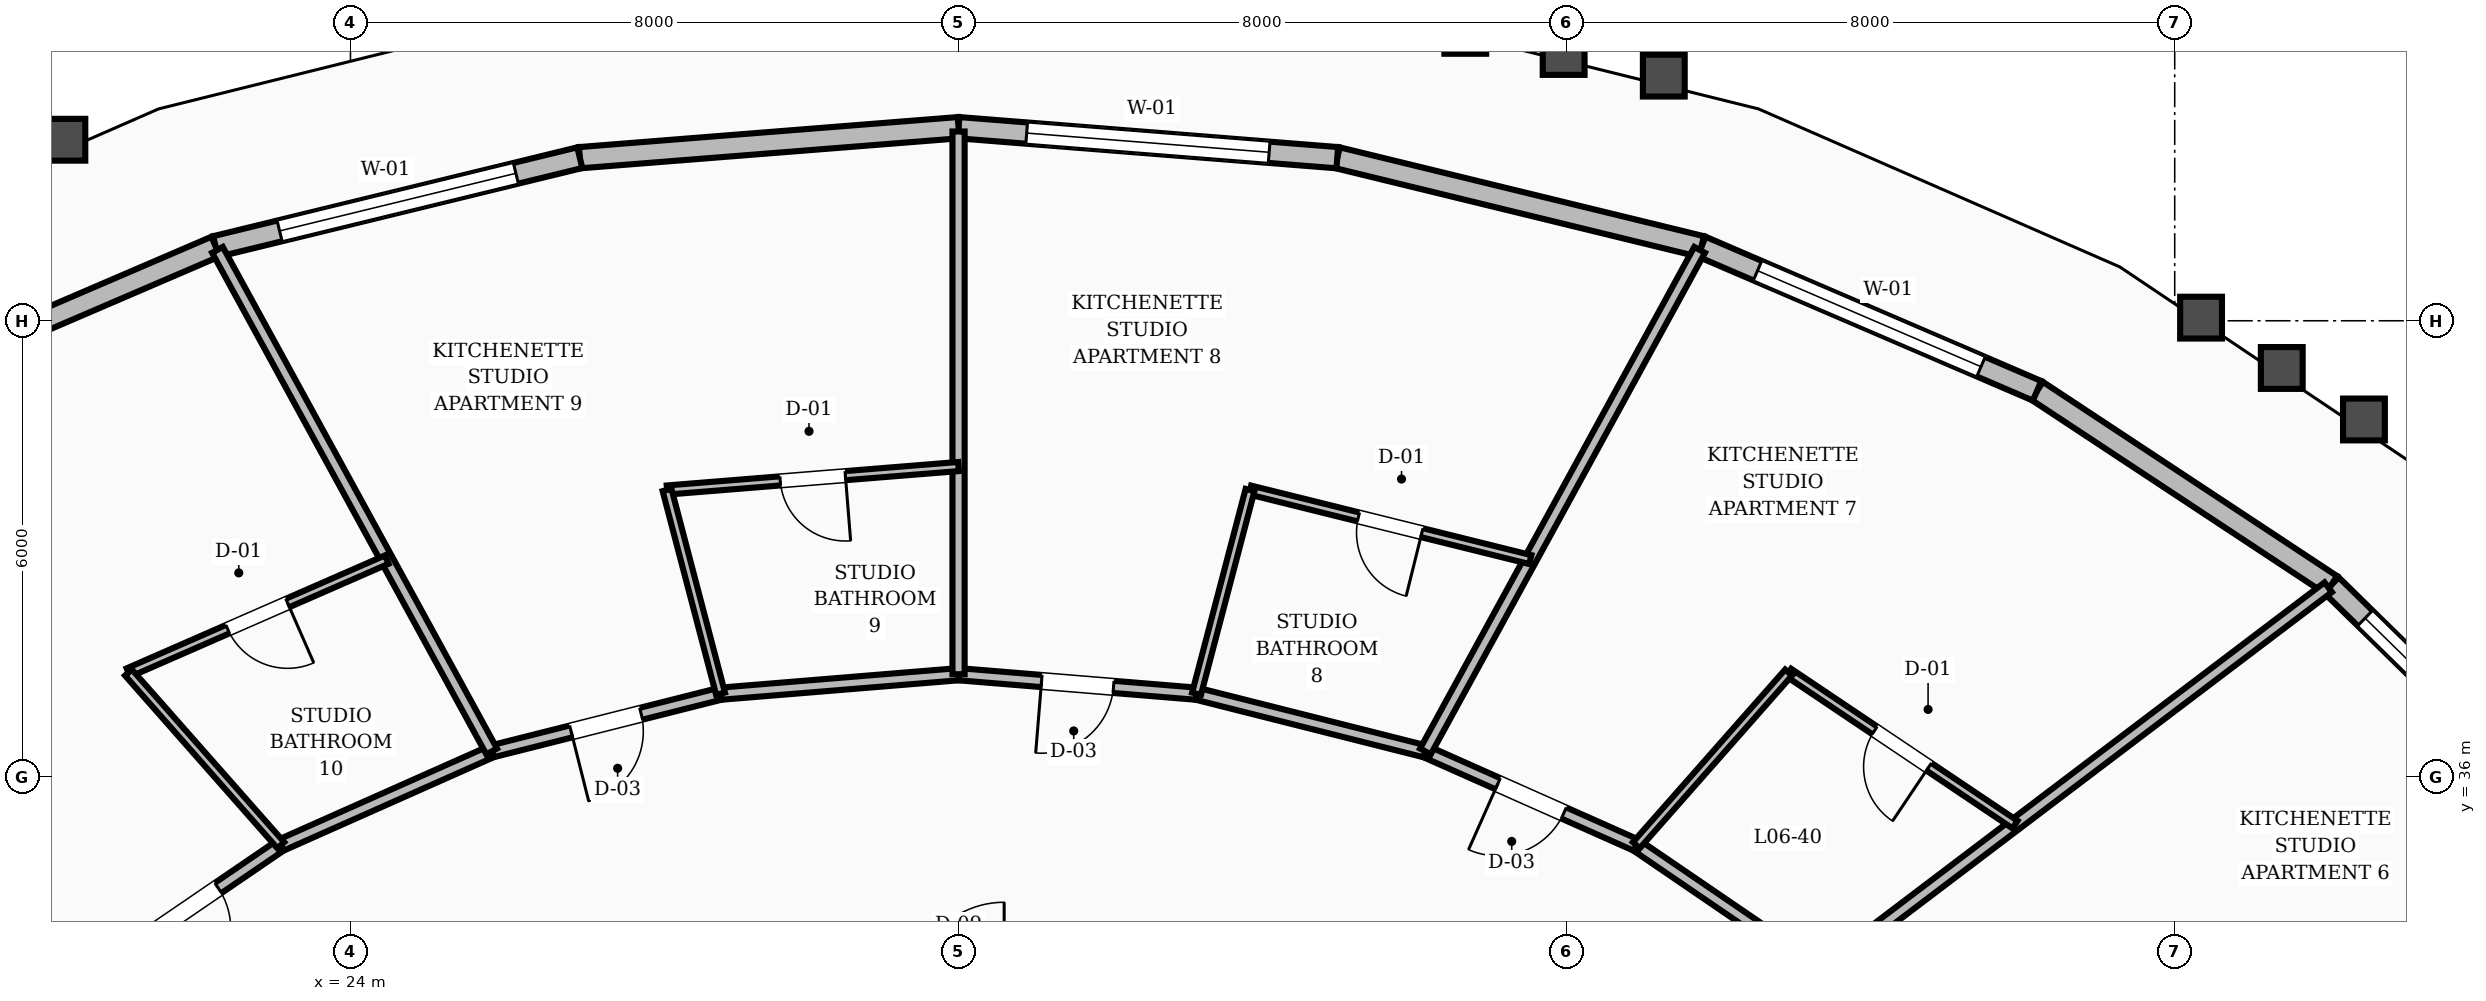
"""IFC4 building model, lengths in metres.
Left out: names, types, materials, properties, quantities, classifications, styles, units other than length and angle.
Written with IfcOpenShell. Run it as: python <this file> out.ifc"""

import sys

from ifc_helpers import new_model, si_unit, direction, frame, frame_2d, origin, place, context, subcontext, project, spatial, rectangle, extrude, element, fill, save


model = new_model("IFC4")
c1 = context("Model", 3, precision=1e-05, world=origin(), true_north=direction((0.0, 1.0)))
c2 = subcontext(c1, "Body", "Model", "MODEL_VIEW")
j1 = project(units=[si_unit("LENGTHUNIT", "METRE"), si_unit("PLANEANGLEUNIT", "RADIAN")], contexts=[c1])
p1 = place(None, origin())
s1 = spatial("IfcSite", under=j1, at=p1, CompositionType="ELEMENT")
p2 = place(p1, origin())
s2 = spatial("IfcBuilding", under=s1, at=p2, CompositionType="ELEMENT")
p3 = place(p2, frame((0.0, 0.0, 30.4)))
s3 = spatial("IfcBuildingStorey", under=s2, at=p3, CompositionType="ELEMENT", Elevation=30.4)
p4 = place(p3, frame((53.236, 35.411, 0.0), z_axis=(0.0, 0.0, 1.0), x_axis=(-0.714207899037, 0.699933623248, 0.0)))
e1 = element("IfcWall", 1, at=p4, inside=s3, PredefinedType="STANDARD", context=c2, shape_type="SweptSolid", body=[
    extrude(rectangle(XDim=4.447, YDim=0.28, at=frame_2d((2.224, 0.0))), origin(), (0.0, 0.0, 1.0), 2.65),
])
p5 = place(p4, frame((0.624, 0.0, 0.8)))
e2 = element("IfcOpeningElement", 2, at=p5, cuts=e1, PredefinedType="OPENING", context=c2, shape_type="SweptSolid", body=[
    extrude(rectangle(XDim=3.2, YDim=1.65, at=frame_2d((1.6, 0.825))), frame((0.0, 0.15, 0.0), z_axis=(0.0, -1.0, 0.0), x_axis=(1.0, 0.0, 0.0)), (0.0, 0.0, 1.0), 0.3),
])
p6 = place(p3, frame((50.06, 38.524, 0.0), z_axis=(0.0, 0.0, 1.0), x_axis=(-0.834608922487, 0.550842941776, 0.0)))
e3 = element("IfcWall", 3, at=p6, inside=s3, PredefinedType="STANDARD", context=c2, shape_type="SweptSolid", body=[
    extrude(rectangle(XDim=4.637, YDim=0.28, at=frame_2d((2.319, 0.0))), origin(), (0.0, 0.0, 1.0), 2.65),
])
p7 = place(p3, frame((46.189, 41.078, 0.0), z_axis=(0.0, 0.0, 1.0), x_axis=(-0.918705683067, 0.394942866629, 0.0)))
e4 = element("IfcWall", 4, at=p7, inside=s3, PredefinedType="STANDARD", context=c2, shape_type="SweptSolid", body=[
    extrude(rectangle(XDim=4.806, YDim=0.28, at=frame_2d((2.403, 0.0))), origin(), (0.0, 0.0, 1.0), 2.65),
])
p8 = place(p7, frame((0.803, 0.0, 0.8)))
e5 = element("IfcOpeningElement", 5, at=p8, cuts=e4, PredefinedType="OPENING", context=c2, shape_type="SweptSolid", body=[
    extrude(rectangle(XDim=3.2, YDim=1.65, at=frame_2d((1.6, 0.825))), frame((0.0, 0.15, 0.0), z_axis=(0.0, -1.0, 0.0), x_axis=(1.0, 0.0, 0.0)), (0.0, 0.0, 1.0), 0.3),
])
p9 = place(p3, frame((41.774, 42.977, 0.0), z_axis=(0.0, 0.0, 1.0), x_axis=(-0.97151283312, 0.236986951292, 0.0)))
e6 = element("IfcWall", 6, at=p9, inside=s3, PredefinedType="STANDARD", context=c2, shape_type="SweptSolid", body=[
    extrude(rectangle(XDim=4.931, YDim=0.28, at=frame_2d((2.466, 0.0))), origin(), (0.0, 0.0, 1.0), 2.65),
])
p10 = place(p3, frame((36.983, 44.145, 0.0), z_axis=(0.0, 0.0, 1.0), x_axis=(-0.996876023292, 0.078982239682, 0.0)))
e7 = element("IfcWall", 7, at=p10, inside=s3, PredefinedType="STANDARD", context=c2, shape_type="SweptSolid", body=[
    extrude(rectangle(XDim=4.998, YDim=0.28, at=frame_2d((2.499, 0.0))), origin(), (0.0, 0.0, 1.0), 2.65),
])
p11 = place(p10, frame((0.899, 0.0, 0.8)))
e8 = element("IfcOpeningElement", 8, at=p11, cuts=e7, PredefinedType="OPENING", context=c2, shape_type="SweptSolid", body=[
    extrude(rectangle(XDim=3.2, YDim=1.65, at=frame_2d((1.6, 0.825))), frame((0.0, 0.15, 0.0), z_axis=(0.0, -1.0, 0.0), x_axis=(1.0, 0.0, 0.0)), (0.0, 0.0, 1.0), 0.3),
])
p12 = place(p3, frame((32.0, 44.54, 0.0), z_axis=(0.0, 0.0, 1.0), x_axis=(-0.996876023292, -0.078982239682, 0.0)))
e9 = element("IfcWall", 9, at=p12, inside=s3, PredefinedType="STANDARD", context=c2, shape_type="SweptSolid", body=[
    extrude(rectangle(XDim=4.998, YDim=0.28, at=frame_2d((2.499, 0.0))), origin(), (0.0, 0.0, 1.0), 2.65),
])
p13 = place(p3, frame((27.017, 44.145, 0.0), z_axis=(0.0, 0.0, 1.0), x_axis=(-0.97151283312, -0.236986951292, 0.0)))
e10 = element("IfcWall", 10, at=p13, inside=s3, PredefinedType="STANDARD", context=c2, shape_type="SweptSolid", body=[
    extrude(rectangle(XDim=4.931, YDim=0.28, at=frame_2d((2.466, 0.0))), origin(), (0.0, 0.0, 1.0), 2.65),
])
p14 = place(p13, frame((0.866, 0.0, 0.8)))
e11 = element("IfcOpeningElement", 11, at=p14, cuts=e10, PredefinedType="OPENING", context=c2, shape_type="SweptSolid", body=[
    extrude(rectangle(XDim=3.2, YDim=1.65, at=frame_2d((1.6, 0.825))), frame((0.0, 0.15, 0.0), z_axis=(0.0, -1.0, 0.0), x_axis=(1.0, 0.0, 0.0)), (0.0, 0.0, 1.0), 0.3),
])
p15 = place(p3, frame((22.226, 42.977, 0.0), z_axis=(0.0, 0.0, 1.0), x_axis=(-0.918705683067, -0.394942866629, 0.0)))
e12 = element("IfcWall", 12, at=p15, inside=s3, PredefinedType="STANDARD", context=c2, shape_type="SweptSolid", body=[
    extrude(rectangle(XDim=4.806, YDim=0.28, at=frame_2d((2.403, 0.0))), origin(), (0.0, 0.0, 1.0), 2.65),
])
p16 = place(p3, frame((43.349, 33.44, 0.0), z_axis=(0.0, 0.0, 1.0), x_axis=(-0.825929039072, 0.563774088104, 0.0)))
e13 = element("IfcWall", 13, at=p16, inside=s3, PredefinedType="SOLIDWALL", context=c2, shape_type="SweptSolid", body=[
    extrude(rectangle(XDim=2.945, YDim=0.16, at=frame_2d((1.472, 0.0))), origin(), (0.0, 0.0, 1.0), 2.61),
])
p17 = place(p3, frame((40.917, 35.1, 0.0), z_axis=(0.0, 0.0, 1.0), x_axis=(-0.913768445178, 0.406235434936, 0.0)))
e14 = element("IfcWall", 14, at=p17, inside=s3, PredefinedType="SOLIDWALL", context=c2, shape_type="SweptSolid", body=[
    extrude(rectangle(XDim=3.037, YDim=0.16, at=frame_2d((1.519, 0.0))), origin(), (0.0, 0.0, 1.0), 2.61),
])
p18 = place(p17, frame((1.043, 0.0, 0.0)))
e15 = element("IfcOpeningElement", 15, at=p18, cuts=e14, PredefinedType="OPENING", context=c2, shape_type="SweptSolid", body=[
    extrude(rectangle(XDim=0.95, YDim=2.1, at=frame_2d((0.475, 1.05))), frame((0.0, 0.09, 0.0), z_axis=(0.0, -1.0, 0.0), x_axis=(1.0, 0.0, 0.0)), (0.0, 0.0, 1.0), 0.18),
])
p19 = place(p3, frame((38.142, 36.334, 0.0), z_axis=(0.0, 0.0, 1.0), x_axis=(-0.969608333194, 0.244662380029, 0.0)))
e16 = element("IfcWall", 16, at=p19, inside=s3, PredefinedType="SOLIDWALL", context=c2, shape_type="SweptSolid", body=[
    extrude(rectangle(XDim=3.105, YDim=0.16, at=frame_2d((1.553, 0.0))), origin(), (0.0, 0.0, 1.0), 2.61),
])
p20 = place(p3, frame((35.131, 37.094, 0.0), z_axis=(0.0, 0.0, 1.0), x_axis=(-0.996658973252, 0.081675522876, 0.0)))
e17 = element("IfcWall", 17, at=p20, inside=s3, PredefinedType="SOLIDWALL", context=c2, shape_type="SweptSolid", body=[
    extrude(rectangle(XDim=3.142, YDim=0.16, at=frame_2d((1.571, 0.0))), origin(), (0.0, 0.0, 1.0), 2.61),
])
p21 = place(p20, frame((1.096, 0.0, 0.0)))
e18 = element("IfcOpeningElement", 18, at=p21, cuts=e17, PredefinedType="OPENING", context=c2, shape_type="SweptSolid", body=[
    extrude(rectangle(XDim=0.95, YDim=2.1, at=frame_2d((0.475, 1.05))), frame((0.0, 0.09, 0.0), z_axis=(0.0, -1.0, 0.0), x_axis=(1.0, 0.0, 0.0)), (0.0, 0.0, 1.0), 0.18),
])
p22 = place(p3, frame((32.0, 37.35, 0.0), z_axis=(0.0, 0.0, 1.0), x_axis=(-0.996658973252, -0.081675522876, 0.0)))
e19 = element("IfcWall", 19, at=p22, inside=s3, PredefinedType="SOLIDWALL", context=c2, shape_type="SweptSolid", body=[
    extrude(rectangle(XDim=3.142, YDim=0.16, at=frame_2d((1.571, 0.0))), origin(), (0.0, 0.0, 1.0), 2.61),
])
p23 = place(p3, frame((28.869, 37.094, 0.0), z_axis=(0.0, 0.0, 1.0), x_axis=(-0.969608333194, -0.244662380029, 0.0)))
e20 = element("IfcWall", 20, at=p23, inside=s3, PredefinedType="SOLIDWALL", context=c2, shape_type="SweptSolid", body=[
    extrude(rectangle(XDim=3.105, YDim=0.16, at=frame_2d((1.553, 0.0))), origin(), (0.0, 0.0, 1.0), 2.61),
])
p24 = place(p23, frame((1.078, 0.0, 0.0)))
e21 = element("IfcOpeningElement", 21, at=p24, cuts=e20, PredefinedType="OPENING", context=c2, shape_type="SweptSolid", body=[
    extrude(rectangle(XDim=0.95, YDim=2.1, at=frame_2d((0.475, 1.05))), frame((0.0, 0.09, 0.0), z_axis=(0.0, -1.0, 0.0), x_axis=(1.0, 0.0, 0.0)), (0.0, 0.0, 1.0), 0.18),
])
p25 = place(p3, frame((25.858, 36.334, 0.0), z_axis=(0.0, 0.0, 1.0), x_axis=(-0.913768445178, -0.406235434936, 0.0)))
e22 = element("IfcWall", 22, at=p25, inside=s3, PredefinedType="SOLIDWALL", context=c2, shape_type="SweptSolid", body=[
    extrude(rectangle(XDim=3.037, YDim=0.16, at=frame_2d((1.519, 0.0))), origin(), (0.0, 0.0, 1.0), 2.61),
])
p26 = place(p3, frame((23.083, 35.1, 0.0), z_axis=(0.0, 0.0, 1.0), x_axis=(-0.825929039072, -0.563774088104, 0.0)))
e23 = element("IfcWall", 23, at=p26, inside=s3, PredefinedType="SOLIDWALL", context=c2, shape_type="SweptSolid", body=[
    extrude(rectangle(XDim=2.945, YDim=0.16, at=frame_2d((1.472, 0.0))), origin(), (0.0, 0.0, 1.0), 2.61),
])
p27 = place(p26, frame((0.997, 0.0, 0.0)))
e24 = element("IfcOpeningElement", 24, at=p27, cuts=e23, PredefinedType="OPENING", context=c2, shape_type="SweptSolid", body=[
    extrude(rectangle(XDim=0.95, YDim=2.1, at=frame_2d((0.475, 1.05))), frame((0.0, 0.09, 0.0), z_axis=(0.0, -1.0, 0.0), x_axis=(1.0, 0.0, 0.0)), (0.0, 0.0, 1.0), 0.18),
])
p28 = place(p3, frame((43.349, 33.44, 0.0), z_axis=(0.0, 0.0, 1.0), x_axis=(0.797056829768, 0.603904305433, 0.0)))
e25 = element("IfcWall", 25, at=p28, inside=s3, PredefinedType="SOLIDWALL", context=c2, shape_type="SweptSolid", body=[
    extrude(rectangle(XDim=8.369, YDim=0.16, at=frame_2d((4.185, 0.0))), origin(), (0.0, 0.0, 1.0), 2.61),
])
p29 = place(p3, frame((45.899, 35.372, 0.0), z_axis=(0.0, 0.0, 1.0), x_axis=(-0.830224279985, 0.557429497716, 0.0)))
e26 = element("IfcWall", 26, at=p29, inside=s3, PredefinedType="PARTITIONING", context=c2, shape_type="SweptSolid", body=[
    extrude(rectangle(XDim=3.588, YDim=0.12, at=frame_2d((1.794, 0.0))), origin(), (0.0, 0.0, 1.0), 2.61),
])
p30 = place(p29, frame((1.364, 0.0, 0.0)))
e27 = element("IfcOpeningElement", 27, at=p30, cuts=e26, PredefinedType="OPENING", context=c2, shape_type="SweptSolid", body=[
    extrude(rectangle(XDim=0.86, YDim=2.1, at=frame_2d((0.43, 1.05))), frame((0.0, 0.07, 0.0), z_axis=(0.0, -1.0, 0.0), x_axis=(1.0, 0.0, 0.0)), (0.0, 0.0, 1.0), 0.14),
])
p31 = place(p3, frame((40.917, 35.1, 0.0), z_axis=(0.0, 0.0, 1.0), x_axis=(0.661427007528, 0.750009542414, 0.0)))
e28 = element("IfcWall", 28, at=p31, inside=s3, PredefinedType="PARTITIONING", context=c2, shape_type="SweptSolid", body=[
    extrude(rectangle(XDim=3.029, YDim=0.12, at=frame_2d((1.515, 0.0))), origin(), (0.0, 0.0, 1.0), 2.61),
])
p32 = place(p3, frame((38.142, 36.334, 0.0), z_axis=(0.0, 0.0, 1.0), x_axis=(0.479700277593, 0.877432415447, 0.0)))
e29 = element("IfcWall", 29, at=p32, inside=s3, PredefinedType="SOLIDWALL", context=c2, shape_type="SweptSolid", body=[
    extrude(rectangle(XDim=7.521, YDim=0.16, at=frame_2d((3.76, 0.0))), origin(), (0.0, 0.0, 1.0), 2.61),
])
p33 = place(p3, frame((39.522, 38.858, 0.0), z_axis=(0.0, 0.0, 1.0), x_axis=(-0.970549351757, 0.240902378161, 0.0)))
e30 = element("IfcWall", 30, at=p33, inside=s3, PredefinedType="PARTITIONING", context=c2, shape_type="SweptSolid", body=[
    extrude(rectangle(XDim=3.799, YDim=0.12, at=frame_2d((1.9, 0.0))), origin(), (0.0, 0.0, 1.0), 2.61),
])
p34 = place(p33, frame((1.47, 0.0, 0.0)))
e31 = element("IfcOpeningElement", 31, at=p34, cuts=e30, PredefinedType="OPENING", context=c2, shape_type="SweptSolid", body=[
    extrude(rectangle(XDim=0.86, YDim=2.1, at=frame_2d((0.43, 1.05))), frame((0.0, 0.07, 0.0), z_axis=(0.0, -1.0, 0.0), x_axis=(1.0, 0.0, 0.0)), (0.0, 0.0, 1.0), 0.14),
])
p35 = place(p3, frame((35.131, 37.094, 0.0), z_axis=(0.0, 0.0, 1.0), x_axis=(0.253964079931, 0.967213650702, 0.0)))
e32 = element("IfcWall", 32, at=p35, inside=s3, PredefinedType="PARTITIONING", context=c2, shape_type="SweptSolid", body=[
    extrude(rectangle(XDim=2.771, YDim=0.12, at=frame_2d((1.385, 0.0))), origin(), (0.0, 0.0, 1.0), 2.61),
])
p36 = place(p3, frame((32.0, 37.35, 0.0), z_axis=(0.0, 0.0, 1.0), x_axis=(0.0, 1.0, 0.0)))
e33 = element("IfcWall", 33, at=p36, inside=s3, PredefinedType="SOLIDWALL", context=c2, shape_type="SweptSolid", body=[
    extrude(rectangle(XDim=7.14, YDim=0.16, at=frame_2d((3.57, 0.0))), origin(), (0.0, 0.0, 1.0), 2.61),
])
p37 = place(p3, frame((32.0, 40.082, 0.0), z_axis=(0.0, 0.0, 1.0), x_axis=(-0.996767480524, -0.080340461599, 0.0)))
e34 = element("IfcWall", 34, at=p37, inside=s3, PredefinedType="PARTITIONING", context=c2, shape_type="SweptSolid", body=[
    extrude(rectangle(XDim=3.847, YDim=0.12, at=frame_2d((1.924, 0.0))), origin(), (0.0, 0.0, 1.0), 2.61),
])
p38 = place(p37, frame((1.494, 0.0, 0.0)))
e35 = element("IfcOpeningElement", 35, at=p38, cuts=e34, PredefinedType="OPENING", context=c2, shape_type="SweptSolid", body=[
    extrude(rectangle(XDim=0.86, YDim=2.1, at=frame_2d((0.43, 1.05))), frame((0.0, 0.07, 0.0), z_axis=(0.0, -1.0, 0.0), x_axis=(1.0, 0.0, 0.0)), (0.0, 0.0, 1.0), 0.14),
])
p39 = place(p3, frame((28.869, 37.094, 0.0), z_axis=(0.0, 0.0, 1.0), x_axis=(-0.253964079931, 0.967213650702, 0.0)))
e36 = element("IfcWall", 36, at=p39, inside=s3, PredefinedType="PARTITIONING", context=c2, shape_type="SweptSolid", body=[
    extrude(rectangle(XDim=2.771, YDim=0.12, at=frame_2d((1.385, 0.0))), origin(), (0.0, 0.0, 1.0), 2.61),
])
p40 = place(p3, frame((25.858, 36.334, 0.0), z_axis=(0.0, 0.0, 1.0), x_axis=(-0.479700277593, 0.877432415447, 0.0)))
e37 = element("IfcWall", 37, at=p40, inside=s3, PredefinedType="SOLIDWALL", context=c2, shape_type="SweptSolid", body=[
    extrude(rectangle(XDim=7.521, YDim=0.16, at=frame_2d((3.76, 0.0))), origin(), (0.0, 0.0, 1.0), 2.61),
])
p41 = place(p3, frame((24.478, 38.858, 0.0), z_axis=(0.0, 0.0, 1.0), x_axis=(-0.916219264282, -0.400677251361, 0.0)))
e38 = element("IfcWall", 38, at=p41, inside=s3, PredefinedType="PARTITIONING", context=c2, shape_type="SweptSolid", body=[
    extrude(rectangle(XDim=3.709, YDim=0.12, at=frame_2d((1.854, 0.0))), origin(), (0.0, 0.0, 1.0), 2.61),
])
p42 = place(p41, frame((1.425, 0.0, 0.0)))
e39 = element("IfcOpeningElement", 39, at=p42, cuts=e38, PredefinedType="OPENING", context=c2, shape_type="SweptSolid", body=[
    extrude(rectangle(XDim=0.86, YDim=2.1, at=frame_2d((0.43, 1.05))), frame((0.0, 0.07, 0.0), z_axis=(0.0, -1.0, 0.0), x_axis=(1.0, 0.0, 0.0)), (0.0, 0.0, 1.0), 0.14),
])
p43 = place(p3, frame((23.083, 35.1, 0.0), z_axis=(0.0, 0.0, 1.0), x_axis=(-0.661427007528, 0.750009542414, 0.0)))
e40 = element("IfcWall", 40, at=p43, inside=s3, PredefinedType="PARTITIONING", context=c2, shape_type="SweptSolid", body=[
    extrude(rectangle(XDim=3.029, YDim=0.12, at=frame_2d((1.515, 0.0))), origin(), (0.0, 0.0, 1.0), 2.61),
])
p44 = place(p3, frame((20.651, 33.44, 0.0), z_axis=(0.0, 0.0, 1.0), x_axis=(-0.797056829768, 0.603904305433, 0.0)))
e41 = element("IfcWall", 41, at=p44, inside=s3, PredefinedType="SOLIDWALL", context=c2, shape_type="SweptSolid", body=[
    extrude(rectangle(XDim=8.369, YDim=0.16, at=frame_2d((4.185, 0.0))), origin(), (0.0, 0.0, 1.0), 2.61),
])
p45 = place(p5, origin())
e42 = element("IfcWindow", 42, at=p45, inside=s3, PartitioningType="SINGLE_PANEL", PredefinedType="WINDOW", context=c2, shape_type="SweptSolid", body=[
    extrude(rectangle(XDim=3.2, YDim=1.65, at=frame_2d((1.6, 0.825))), frame((0.0, 0.03, 0.0), z_axis=(0.0, -1.0, 0.0), x_axis=(1.0, 0.0, 0.0)), (0.0, 0.0, 1.0), 0.06),
])
fill(e2, e42)
p46 = place(p8, origin())
e43 = element("IfcWindow", 43, at=p46, inside=s3, PartitioningType="SINGLE_PANEL", PredefinedType="WINDOW", context=c2, shape_type="SweptSolid", body=[
    extrude(rectangle(XDim=3.2, YDim=1.65, at=frame_2d((1.6, 0.825))), frame((0.0, 0.03, 0.0), z_axis=(0.0, -1.0, 0.0), x_axis=(1.0, 0.0, 0.0)), (0.0, 0.0, 1.0), 0.06),
])
fill(e5, e43)
p47 = place(p11, origin())
e44 = element("IfcWindow", 44, at=p47, inside=s3, PartitioningType="SINGLE_PANEL", PredefinedType="WINDOW", context=c2, shape_type="SweptSolid", body=[
    extrude(rectangle(XDim=3.2, YDim=1.65, at=frame_2d((1.6, 0.825))), frame((0.0, 0.03, 0.0), z_axis=(0.0, -1.0, 0.0), x_axis=(1.0, 0.0, 0.0)), (0.0, 0.0, 1.0), 0.06),
])
fill(e8, e44)
p48 = place(p14, origin())
e45 = element("IfcWindow", 45, at=p48, inside=s3, PartitioningType="SINGLE_PANEL", PredefinedType="WINDOW", context=c2, shape_type="SweptSolid", body=[
    extrude(rectangle(XDim=3.2, YDim=1.65, at=frame_2d((1.6, 0.825))), frame((0.0, 0.03, 0.0), z_axis=(0.0, -1.0, 0.0), x_axis=(1.0, 0.0, 0.0)), (0.0, 0.0, 1.0), 0.06),
])
fill(e11, e45)
p49 = place(p30, origin())
e46 = element("IfcDoor", 46, at=p49, inside=s3, OperationType="SINGLE_SWING_LEFT", PredefinedType="DOOR", context=c2, shape_type="SweptSolid", body=[
    extrude(rectangle(XDim=0.86, YDim=2.1, at=frame_2d((0.43, 1.05))), frame((0.0, 0.025, 0.0), z_axis=(0.0, -1.0, 0.0), x_axis=(1.0, 0.0, 0.0)), (0.0, 0.0, 1.0), 0.05),
])
fill(e27, e46)
p50 = place(p18, origin())
e47 = element("IfcDoor", 47, at=p50, inside=s3, OperationType="SINGLE_SWING_RIGHT", PredefinedType="DOOR", context=c2, shape_type="SweptSolid", body=[
    extrude(rectangle(XDim=0.95, YDim=2.1, at=frame_2d((0.475, 1.05))), frame((0.0, 0.025, 0.0), z_axis=(0.0, -1.0, 0.0), x_axis=(1.0, 0.0, 0.0)), (0.0, 0.0, 1.0), 0.05),
])
fill(e15, e47)
p51 = place(p34, origin())
e48 = element("IfcDoor", 48, at=p51, inside=s3, OperationType="SINGLE_SWING_LEFT", PredefinedType="DOOR", context=c2, shape_type="SweptSolid", body=[
    extrude(rectangle(XDim=0.86, YDim=2.1, at=frame_2d((0.43, 1.05))), frame((0.0, 0.025, 0.0), z_axis=(0.0, -1.0, 0.0), x_axis=(1.0, 0.0, 0.0)), (0.0, 0.0, 1.0), 0.05),
])
fill(e31, e48)
p52 = place(p21, origin())
e49 = element("IfcDoor", 49, at=p52, inside=s3, OperationType="SINGLE_SWING_RIGHT", PredefinedType="DOOR", context=c2, shape_type="SweptSolid", body=[
    extrude(rectangle(XDim=0.95, YDim=2.1, at=frame_2d((0.475, 1.05))), frame((0.0, 0.025, 0.0), z_axis=(0.0, -1.0, 0.0), x_axis=(1.0, 0.0, 0.0)), (0.0, 0.0, 1.0), 0.05),
])
fill(e18, e49)
p53 = place(p38, origin())
e50 = element("IfcDoor", 50, at=p53, inside=s3, OperationType="SINGLE_SWING_LEFT", PredefinedType="DOOR", context=c2, shape_type="SweptSolid", body=[
    extrude(rectangle(XDim=0.86, YDim=2.1, at=frame_2d((0.43, 1.05))), frame((0.0, 0.025, 0.0), z_axis=(0.0, -1.0, 0.0), x_axis=(1.0, 0.0, 0.0)), (0.0, 0.0, 1.0), 0.05),
])
fill(e35, e50)
p54 = place(p24, origin())
e51 = element("IfcDoor", 51, at=p54, inside=s3, OperationType="SINGLE_SWING_RIGHT", PredefinedType="DOOR", context=c2, shape_type="SweptSolid", body=[
    extrude(rectangle(XDim=0.95, YDim=2.1, at=frame_2d((0.475, 1.05))), frame((0.0, 0.025, 0.0), z_axis=(0.0, -1.0, 0.0), x_axis=(1.0, 0.0, 0.0)), (0.0, 0.0, 1.0), 0.05),
])
fill(e21, e51)
p55 = place(p42, origin())
e52 = element("IfcDoor", 52, at=p55, inside=s3, OperationType="SINGLE_SWING_LEFT", PredefinedType="DOOR", context=c2, shape_type="SweptSolid", body=[
    extrude(rectangle(XDim=0.86, YDim=2.1, at=frame_2d((0.43, 1.05))), frame((0.0, 0.025, 0.0), z_axis=(0.0, -1.0, 0.0), x_axis=(1.0, 0.0, 0.0)), (0.0, 0.0, 1.0), 0.05),
])
fill(e39, e52)
p56 = place(p27, origin())
e53 = element("IfcDoor", 53, at=p56, inside=s3, OperationType="SINGLE_SWING_RIGHT", PredefinedType="DOOR", context=c2, shape_type="SweptSolid", body=[
    extrude(rectangle(XDim=0.95, YDim=2.1, at=frame_2d((0.475, 1.05))), frame((0.0, 0.025, 0.0), z_axis=(0.0, -1.0, 0.0), x_axis=(1.0, 0.0, 0.0)), (0.0, 0.0, 1.0), 0.05),
])
fill(e24, e53)
save(model, sys.argv[1])
